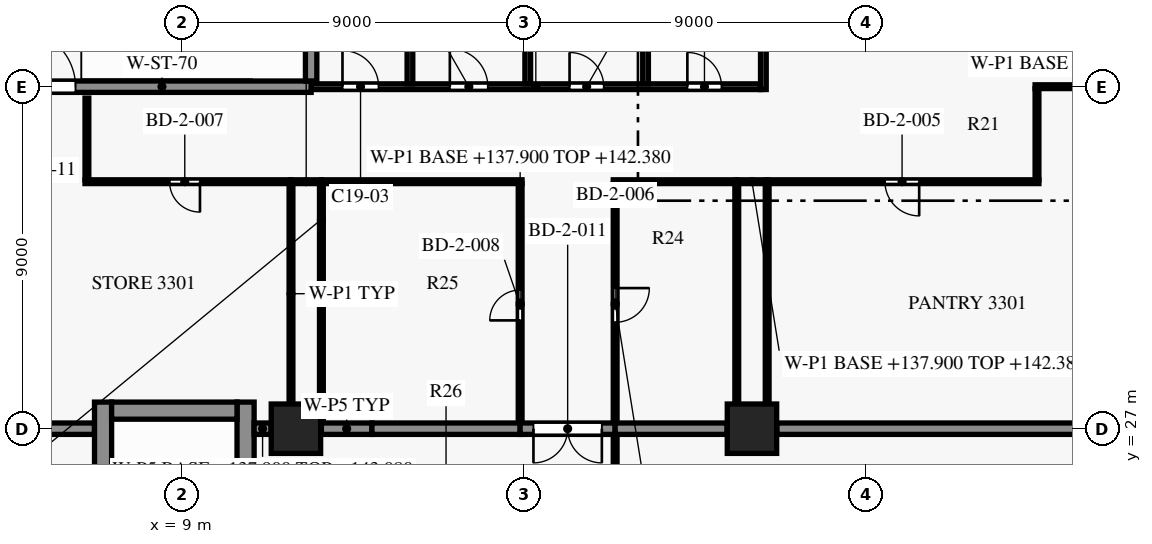
"""IFC4 building model, lengths in metres.
Left out: names, types, materials, properties, quantities, classifications, styles, units other than length and angle.
Written with IfcOpenShell. Run it as: python <this file> out.ifc"""

import sys

from ifc_helpers import new_model, si_unit, direction, frame, frame_2d, origin, origin_2d, place, context, subcontext, project, spatial, rectangle, extrude, element, fill, save


model = new_model("IFC4")
c1 = context("Model", 3, precision=1e-05, world=origin(), true_north=direction((0.0, 1.0)))
c2 = subcontext(c1, "Body", "Model", "MODEL_VIEW")
j1 = project(units=[si_unit("LENGTHUNIT", "METRE"), si_unit("PLANEANGLEUNIT", "RADIAN")], contexts=[c1])
p1 = place(None, origin())
s1 = spatial("IfcSite", under=j1, at=p1, CompositionType="ELEMENT")
p2 = place(p1, origin())
s2 = spatial("IfcBuilding", under=s1, at=p2, CompositionType="ELEMENT")
p3 = place(p2, frame((0.0, 0.0, 137.9)))
s3 = spatial("IfcBuildingStorey", under=s2, at=p3, CompositionType="ELEMENT", Elevation=137.9)
for number, where, z_axis, x_axis in (
    (1, (12.0, 27.0, 0.0), (0.0, 0.0, 1.0), (1.0, 0.0, 0.0)),
    (2, (24.0, 27.0, 0.0), (0.0, 0.0, 1.0), (1.0, 0.0, 0.0)),
):
    element("IfcColumn", number, at=place(p3, frame(where, z_axis=z_axis, x_axis=x_axis)), inside=s3, PredefinedType="COLUMN", context=c2, shape_type="SweptSolid", body=[
        extrude(rectangle(XDim=1.3, YDim=1.3, at=origin_2d()), origin(), (0.0, 0.0, 1.0), 5.5),
    ])
p4 = place(p3, frame((7.15, 27.475, 0.0), z_axis=(0.0, 0.0, 1.0), x_axis=(1.0, 0.0, 0.0)))
e3 = element("IfcWall", 3, at=p4, inside=s3, PredefinedType="SHEAR", context=c2, shape_type="SweptSolid", body=[
    extrude(rectangle(XDim=3.3, YDim=0.45, at=frame_2d((1.65, 0.0))), origin(), (0.0, 0.0, 1.0), 5.2),
])
p5 = place(p3, frame((12.4, 36.0, 0.0), z_axis=(0.0, 0.0, 1.0), x_axis=(1.0, 0.0, 0.0)))
e4 = element("IfcWall", 4, at=p5, inside=s3, PredefinedType="SHEAR", context=c2, shape_type="SweptSolid", body=[
    extrude(rectangle(XDim=11.825, YDim=0.15, at=frame_2d((5.913, 0.0))), origin(), (0.0, 0.0, 1.0), 5.2),
])
p6 = place(p5, frame((0.825, 0.0, 0.0)))
e5 = element("IfcOpeningElement", 5, at=p6, cuts=e4, PredefinedType="OPENING", context=c2, shape_type="SweptSolid", body=[
    extrude(rectangle(XDim=0.95, YDim=2.1, at=frame_2d((0.475, 1.05))), frame((0.0, 0.085, 0.0), z_axis=(0.0, -1.0, 0.0), x_axis=(1.0, 0.0, 0.0)), (0.0, 0.0, 1.0), 0.17),
])
p7 = place(p5, frame((3.65, 0.0, 0.0)))
e6 = element("IfcOpeningElement", 6, at=p7, cuts=e4, PredefinedType="OPENING", context=c2, shape_type="SweptSolid", body=[
    extrude(rectangle(XDim=1.0, YDim=2.1, at=frame_2d((0.5, 1.05))), frame((0.0, 0.085, 0.0), z_axis=(0.0, -1.0, 0.0), x_axis=(1.0, 0.0, 0.0)), (0.0, 0.0, 1.0), 0.17),
])
p8 = place(p5, frame((6.8, 0.0, 0.0)))
e7 = element("IfcOpeningElement", 7, at=p8, cuts=e4, PredefinedType="OPENING", context=c2, shape_type="SweptSolid", body=[
    extrude(rectangle(XDim=0.9, YDim=2.1, at=frame_2d((0.45, 1.05))), frame((0.0, 0.085, 0.0), z_axis=(0.0, -1.0, 0.0), x_axis=(1.0, 0.0, 0.0)), (0.0, 0.0, 1.0), 0.17),
])
p9 = place(p5, frame((9.9, 0.0, 0.0)))
e8 = element("IfcOpeningElement", 8, at=p9, cuts=e4, PredefinedType="OPENING", context=c2, shape_type="SweptSolid", body=[
    extrude(rectangle(XDim=0.9, YDim=2.1, at=frame_2d((0.45, 1.05))), frame((0.0, 0.085, 0.0), z_axis=(0.0, -1.0, 0.0), x_axis=(1.0, 0.0, 0.0)), (0.0, 0.0, 1.0), 0.17),
])
p10 = place(p3, frame((4.55, 36.0, 0.0), z_axis=(0.0, 0.0, 1.0), x_axis=(1.0, 0.0, 0.0)))
e9 = element("IfcWall", 9, at=p10, inside=s3, PredefinedType="SHEAR", context=c2, shape_type="SweptSolid", body=[
    extrude(rectangle(XDim=7.85, YDim=0.3, at=frame_2d((3.925, 0.0))), origin(), (0.0, 0.0, 1.0), 5.2),
])
p11 = place(p10, frame((0.15, 0.0, 0.0)))
e10 = element("IfcOpeningElement", 10, at=p11, cuts=e9, PredefinedType="OPENING", context=c2, shape_type="SweptSolid", body=[
    extrude(rectangle(XDim=1.5, YDim=2.2, at=frame_2d((0.75, 1.1))), frame((0.0, 0.16, 0.0), z_axis=(0.0, -1.0, 0.0), x_axis=(1.0, 0.0, 0.0)), (0.0, 0.0, 1.0), 0.32),
])
p12 = place(p3, frame((6.925, 19.1, 0.0), z_axis=(0.0, 0.0, 1.0), x_axis=(0.0, 1.0, 0.0)))
e11 = element("IfcWall", 11, at=p12, inside=s3, PredefinedType="SHEAR", context=c2, shape_type="SweptSolid", body=[
    extrude(rectangle(XDim=8.6, YDim=0.45, at=frame_2d((4.3, 0.0))), origin(), (0.0, 0.0, 1.0), 5.2),
])
p13 = place(p3, frame((10.675, 19.1, 0.0), z_axis=(0.0, 0.0, 1.0), x_axis=(0.0, 1.0, 0.0)))
e12 = element("IfcWall", 12, at=p13, inside=s3, PredefinedType="SHEAR", context=c2, shape_type="SweptSolid", body=[
    extrude(rectangle(XDim=8.6, YDim=0.45, at=frame_2d((4.3, 0.0))), origin(), (0.0, 0.0, 1.0), 5.2),
])
p14 = place(p13, frame((0.7, 0.0, 0.0)))
e13 = element("IfcOpeningElement", 13, at=p14, cuts=e12, PredefinedType="OPENING", context=c2, shape_type="SweptSolid", body=[
    extrude(rectangle(XDim=1.2, YDim=2.2, at=frame_2d((0.6, 1.1))), frame((0.0, 0.235, 0.0), z_axis=(0.0, -1.0, 0.0), x_axis=(1.0, 0.0, 0.0)), (0.0, 0.0, 1.0), 0.47),
])
p15 = place(p3, frame((12.4, 36.15, 0.0), z_axis=(0.0, 0.0, 1.0), x_axis=(0.0, 1.0, 0.0)))
e14 = element("IfcWall", 14, at=p15, inside=s3, PredefinedType="SHEAR", context=c2, shape_type="SweptSolid", body=[
    extrude(rectangle(XDim=3.725, YDim=0.3, at=frame_2d((1.863, 0.0))), origin(), (0.0, 0.0, 1.0), 5.2),
])
for number, where, z_axis, x_axis in (
    (15, (15.0, 36.075, 0.0), (0.0, 0.0, 1.0), (0.0, 1.0, 0.0)),
    (16, (18.1, 36.075, 0.0), (0.0, 0.0, 1.0), (0.0, 1.0, 0.0)),
    (17, (21.2, 36.075, 0.0), (0.0, 0.0, 1.0), (0.0, 1.0, 0.0)),
):
    element("IfcWall", number, at=place(p3, frame(where, z_axis=z_axis, x_axis=x_axis)), inside=s3, PredefinedType="PARTITIONING", context=c2, shape_type="SweptSolid", body=[
        extrude(rectangle(XDim=3.8, YDim=0.15, at=frame_2d((1.9, 0.0))), origin(), (0.0, 0.0, 1.0), 5.2),
    ])
p16 = place(p3, frame((24.3, 35.925, 0.0), z_axis=(0.0, 0.0, 1.0), x_axis=(0.0, 1.0, 0.0)))
e18 = element("IfcWall", 18, at=p16, inside=s3, PredefinedType="SHEAR", context=c2, shape_type="SweptSolid", body=[
    extrude(rectangle(XDim=4.075, YDim=0.15, at=frame_2d((2.038, 0.0))), origin(), (0.0, 0.0, 1.0), 5.2),
])
p17 = place(p3, frame((20.4, 26.83, 0.0), z_axis=(0.0, 0.0, 1.0), x_axis=(0.0, -1.0, 0.0)))
e19 = element("IfcWall", 19, at=p17, inside=s3, PredefinedType="PARTITIONING", context=c2, shape_type="SweptSolid", body=[
    extrude(rectangle(XDim=20.78, YDim=0.1, at=frame_2d((10.39, 0.0))), origin(), (0.0, 0.0, 1.0), 3.68),
])
p18 = place(p3, frame((6.7, 27.0, 0.0), z_axis=(0.0, 0.0, 1.0), x_axis=(-1.0, 0.0, 0.0)))
e20 = element("IfcWall", 20, at=p18, inside=s3, PredefinedType="PARTITIONING", context=c2, shape_type="SweptSolid", body=[
    extrude(rectangle(XDim=3.75, YDim=0.3, at=frame_2d((1.875, 0.0))), origin(), (0.0, 0.0, 1.0), 4.48),
])
p19 = place(p3, frame((10.9, 27.0, 0.0), z_axis=(0.0, 0.0, 1.0), x_axis=(1.0, 0.0, 0.0)))
e21 = element("IfcWall", 21, at=p19, inside=s3, PredefinedType="PARTITIONING", context=c2, shape_type="SweptSolid", body=[
    extrude(rectangle(XDim=0.445, YDim=0.3, at=frame_2d((0.223, 0.0))), origin(), (0.0, 0.0, 1.0), 5.18),
])
p20 = place(p3, frame((12.67, 27.0, 0.0), z_axis=(0.0, 0.0, 1.0), x_axis=(1.0, 0.0, 0.0)))
e22 = element("IfcWall", 22, at=p20, inside=s3, PredefinedType="PARTITIONING", context=c2, shape_type="SweptSolid", body=[
    extrude(rectangle(XDim=1.33, YDim=0.3, at=frame_2d((0.665, 0.0))), origin(), (0.0, 0.0, 1.0), 4.48),
])
p21 = place(p3, frame((14.0, 27.0, 0.0), z_axis=(0.0, 0.0, 1.0), x_axis=(1.0, 0.0, 0.0)))
e23 = element("IfcWall", 23, at=p21, inside=s3, PredefinedType="PARTITIONING", context=c2, shape_type="SweptSolid", body=[
    extrude(rectangle(XDim=3.9, YDim=0.3, at=frame_2d((1.95, 0.0))), origin(), (0.0, 0.0, 1.0), 4.48),
])
p22 = place(p3, frame((20.4, 27.0, 0.0), z_axis=(0.0, 0.0, 1.0), x_axis=(-1.0, 0.0, 0.0)))
e24 = element("IfcWall", 24, at=p22, inside=s3, PredefinedType="PARTITIONING", context=c2, shape_type="SweptSolid", body=[
    extrude(rectangle(XDim=2.5, YDim=0.3, at=frame_2d((1.25, 0.0))), origin(), (0.0, 0.0, 1.0), 4.48),
])
p23 = place(p22, frame((0.35, 0.0, 0.0)))
e25 = element("IfcOpeningElement", 25, at=p23, cuts=e24, PredefinedType="OPENING", context=c2, shape_type="SweptSolid", body=[
    extrude(rectangle(XDim=1.8, YDim=2.1, at=frame_2d((0.9, 1.05))), frame((0.0, 0.16, 0.0), z_axis=(0.0, -1.0, 0.0), x_axis=(1.0, 0.0, 0.0)), (0.0, 0.0, 1.0), 0.32),
])
p24 = place(p3, frame((23.345, 27.0, 0.0), z_axis=(0.0, 0.0, 1.0), x_axis=(-1.0, 0.0, 0.0)))
e26 = element("IfcWall", 26, at=p24, inside=s3, PredefinedType="PARTITIONING", context=c2, shape_type="SweptSolid", body=[
    extrude(rectangle(XDim=2.945, YDim=0.3, at=frame_2d((1.473, 0.0))), origin(), (0.0, 0.0, 1.0), 4.48),
])
p25 = place(p3, frame((33.05, 27.0, 0.0), z_axis=(0.0, 0.0, 1.0), x_axis=(-1.0, 0.0, 0.0)))
e27 = element("IfcWall", 27, at=p25, inside=s3, PredefinedType="PARTITIONING", context=c2, shape_type="SweptSolid", body=[
    extrude(rectangle(XDim=8.395, YDim=0.3, at=frame_2d((4.198, 0.0))), origin(), (0.0, 0.0, 1.0), 4.48),
])
p26 = place(p3, frame((12.67, 27.17, 0.0), z_axis=(0.0, 0.0, 1.0), x_axis=(0.0, 1.0, 0.0)))
e28 = element("IfcWall", 28, at=p26, inside=s3, PredefinedType="PARTITIONING", context=c2, shape_type="SweptSolid", body=[
    extrude(rectangle(XDim=6.28, YDim=0.1, at=frame_2d((3.14, 0.0))), origin(), (0.0, 0.0, 1.0), 4.48),
])
p27 = place(p3, frame((17.9, 27.17, 0.0), z_axis=(0.0, 0.0, 1.0), x_axis=(0.0, 1.0, 0.0)))
e29 = element("IfcWall", 29, at=p27, inside=s3, PredefinedType="PARTITIONING", context=c2, shape_type="SweptSolid", body=[
    extrude(rectangle(XDim=6.28, YDim=0.1, at=frame_2d((3.14, 0.0))), origin(), (0.0, 0.0, 1.0), 4.48),
])
p28 = place(p27, frame((2.68, 0.0, 0.0)))
e30 = element("IfcOpeningElement", 30, at=p28, cuts=e29, PredefinedType="OPENING", context=c2, shape_type="SweptSolid", body=[
    extrude(rectangle(XDim=0.8, YDim=2.1, at=frame_2d((0.4, 1.05))), frame((0.0, 0.06, 0.0), z_axis=(0.0, -1.0, 0.0), x_axis=(1.0, 0.0, 0.0)), (0.0, 0.0, 1.0), 0.12),
])
for number, where, z_axis, x_axis in (
    (31, (24.4, 27.655, 0.0), (0.0, 0.0, 1.0), (0.0, 1.0, 0.0)),
    (32, (11.87, 33.45, 0.0), (0.0, 0.0, 1.0), (0.0, -1.0, 0.0)),
):
    element("IfcWall", number, at=place(p3, frame(where, z_axis=z_axis, x_axis=x_axis)), inside=s3, PredefinedType="PARTITIONING", context=c2, shape_type="SweptSolid", body=[
        extrude(rectangle(XDim=5.795, YDim=0.1, at=frame_2d((2.897, 0.0))), origin(), (0.0, 0.0, 1.0), 5.18),
    ])
p29 = place(p3, frame((20.4, 33.45, 0.0), z_axis=(0.0, 0.0, 1.0), x_axis=(0.0, -1.0, 0.0)))
e33 = element("IfcWall", 33, at=p29, inside=s3, PredefinedType="PARTITIONING", context=c2, shape_type="SweptSolid", body=[
    extrude(rectangle(XDim=6.28, YDim=0.1, at=frame_2d((3.14, 0.0))), origin(), (0.0, 0.0, 1.0), 4.48),
])
p30 = place(p29, frame((2.75, 0.0, 0.0)))
e34 = element("IfcOpeningElement", 34, at=p30, cuts=e33, PredefinedType="OPENING", context=c2, shape_type="SweptSolid", body=[
    extrude(rectangle(XDim=0.9, YDim=2.1, at=frame_2d((0.45, 1.05))), frame((0.0, 0.06, 0.0), z_axis=(0.0, -1.0, 0.0), x_axis=(1.0, 0.0, 0.0)), (0.0, 0.0, 1.0), 0.12),
])
p31 = place(p3, frame((23.6, 33.45, 0.0), z_axis=(0.0, 0.0, 1.0), x_axis=(0.0, -1.0, 0.0)))
e35 = element("IfcWall", 35, at=p31, inside=s3, PredefinedType="PARTITIONING", context=c2, shape_type="SweptSolid", body=[
    extrude(rectangle(XDim=5.795, YDim=0.1, at=frame_2d((2.897, 0.0))), origin(), (0.0, 0.0, 1.0), 5.18),
])
p32 = place(p3, frame((11.87, 33.5, 0.0), z_axis=(0.0, 0.0, 1.0), x_axis=(-1.0, 0.0, 0.0)))
e36 = element("IfcWall", 36, at=p32, inside=s3, PredefinedType="PARTITIONING", context=c2, shape_type="SweptSolid", body=[
    extrude(rectangle(XDim=5.42, YDim=0.1, at=frame_2d((2.71, 0.0))), origin(), (0.0, 0.0, 1.0), 5.18),
])
p33 = place(p32, frame((2.395, 0.0, 0.0)))
e37 = element("IfcOpeningElement", 37, at=p33, cuts=e36, PredefinedType="OPENING", context=c2, shape_type="SweptSolid", body=[
    extrude(rectangle(XDim=0.8, YDim=2.1, at=frame_2d((0.4, 1.05))), frame((0.0, 0.06, 0.0), z_axis=(0.0, -1.0, 0.0), x_axis=(1.0, 0.0, 0.0)), (0.0, 0.0, 1.0), 0.12),
])
p34 = place(p3, frame((12.67, 33.5, 0.0), z_axis=(0.0, 0.0, 1.0), x_axis=(-1.0, 0.0, 0.0)))
e38 = element("IfcWall", 38, at=p34, inside=s3, PredefinedType="PARTITIONING", context=c2, shape_type="SweptSolid", body=[
    extrude(rectangle(XDim=0.8, YDim=0.1, at=frame_2d((0.4, 0.0))), origin(), (0.0, 0.0, 1.0), 4.48),
])
p35 = place(p3, frame((17.95, 33.5, 0.0), z_axis=(0.0, 0.0, 1.0), x_axis=(-1.0, 0.0, 0.0)))
e39 = element("IfcWall", 39, at=p35, inside=s3, PredefinedType="PARTITIONING", context=c2, shape_type="SweptSolid", body=[
    extrude(rectangle(XDim=5.28, YDim=0.1, at=frame_2d((2.64, 0.0))), origin(), (0.0, 0.0, 1.0), 5.18),
])
p36 = place(p3, frame((23.6, 33.5, 0.0), z_axis=(0.0, 0.0, 1.0), x_axis=(-1.0, 0.0, 0.0)))
e40 = element("IfcWall", 40, at=p36, inside=s3, PredefinedType="PARTITIONING", context=c2, shape_type="SweptSolid", body=[
    extrude(rectangle(XDim=3.25, YDim=0.1, at=frame_2d((1.625, 0.0))), origin(), (0.0, 0.0, 1.0), 5.18),
])
p37 = place(p3, frame((24.4, 33.5, 0.0), z_axis=(0.0, 0.0, 1.0), x_axis=(-1.0, 0.0, 0.0)))
e41 = element("IfcWall", 41, at=p37, inside=s3, PredefinedType="PARTITIONING", context=c2, shape_type="SweptSolid", body=[
    extrude(rectangle(XDim=0.8, YDim=0.1, at=frame_2d((0.4, 0.0))), origin(), (0.0, 0.0, 1.0), 4.48),
])
p38 = place(p3, frame((31.55, 33.5, 0.0), z_axis=(0.0, 0.0, 1.0), x_axis=(-1.0, 0.0, 0.0)))
e42 = element("IfcWall", 42, at=p38, inside=s3, PredefinedType="PARTITIONING", context=c2, shape_type="SweptSolid", body=[
    extrude(rectangle(XDim=7.15, YDim=0.1, at=frame_2d((3.575, 0.0))), origin(), (0.0, 0.0, 1.0), 5.18),
])
p39 = place(p38, frame((3.15, 0.0, 0.0)))
e43 = element("IfcOpeningElement", 43, at=p39, cuts=e42, PredefinedType="OPENING", context=c2, shape_type="SweptSolid", body=[
    extrude(rectangle(XDim=0.9, YDim=2.1, at=frame_2d((0.45, 1.05))), frame((0.0, 0.06, 0.0), z_axis=(0.0, -1.0, 0.0), x_axis=(1.0, 0.0, 0.0)), (0.0, 0.0, 1.0), 0.12),
])
p40 = place(p3, frame((6.5, 33.55, 0.0), z_axis=(0.0, 0.0, 1.0), x_axis=(0.0, 1.0, 0.0)))
e44 = element("IfcWall", 44, at=p40, inside=s3, PredefinedType="PARTITIONING", context=c2, shape_type="SweptSolid", body=[
    extrude(rectangle(XDim=2.15, YDim=0.1, at=frame_2d((1.075, 0.0))), origin(), (0.0, 0.0, 1.0), 5.18),
])
p41 = place(p3, frame((31.5, 35.95, 0.0), z_axis=(0.0, 0.0, 1.0), x_axis=(0.0, -1.0, 0.0)))
e45 = element("IfcWall", 45, at=p41, inside=s3, PredefinedType="PARTITIONING", context=c2, shape_type="SweptSolid", body=[
    extrude(rectangle(XDim=2.4, YDim=0.1, at=frame_2d((1.2, 0.0))), origin(), (0.0, 0.0, 1.0), 5.18),
])
p42 = place(p3, frame((35.95, 36.0, 0.0), z_axis=(0.0, 0.0, 1.0), x_axis=(-1.0, 0.0, 0.0)))
e46 = element("IfcWall", 46, at=p42, inside=s3, PredefinedType="PARTITIONING", context=c2, shape_type="SweptSolid", body=[
    extrude(rectangle(XDim=4.5, YDim=0.1, at=frame_2d((2.25, 0.0))), origin(), (0.0, 0.0, 1.0), 4.48),
])
p43 = place(p6, origin())
e47 = element("IfcDoor", 47, at=p43, inside=s3, OperationType="SINGLE_SWING_RIGHT", PredefinedType="DOOR", context=c2, shape_type="SweptSolid", body=[
    extrude(rectangle(XDim=0.95, YDim=2.1, at=frame_2d((0.475, 1.05))), frame((0.0, 0.025, 0.0), z_axis=(0.0, -1.0, 0.0), x_axis=(1.0, 0.0, 0.0)), (0.0, 0.0, 1.0), 0.05),
])
fill(e5, e47)
p44 = place(p7, origin())
e48 = element("IfcDoor", 48, at=p44, inside=s3, OperationType="SINGLE_SWING_LEFT", PredefinedType="DOOR", context=c2, shape_type="SweptSolid", body=[
    extrude(rectangle(XDim=1.0, YDim=2.1, at=frame_2d((0.5, 1.05))), frame((0.0, 0.025, 0.0), z_axis=(0.0, -1.0, 0.0), x_axis=(1.0, 0.0, 0.0)), (0.0, 0.0, 1.0), 0.05),
])
fill(e6, e48)
p45 = place(p8, origin())
e49 = element("IfcDoor", 49, at=p45, inside=s3, OperationType="SINGLE_SWING_RIGHT", PredefinedType="DOOR", context=c2, shape_type="SweptSolid", body=[
    extrude(rectangle(XDim=0.9, YDim=2.1, at=frame_2d((0.45, 1.05))), frame((0.0, 0.025, 0.0), z_axis=(0.0, -1.0, 0.0), x_axis=(1.0, 0.0, 0.0)), (0.0, 0.0, 1.0), 0.05),
])
fill(e7, e49)
p46 = place(p9, origin())
e50 = element("IfcDoor", 50, at=p46, inside=s3, OperationType="SINGLE_SWING_LEFT", PredefinedType="DOOR", context=c2, shape_type="SweptSolid", body=[
    extrude(rectangle(XDim=0.9, YDim=2.1, at=frame_2d((0.45, 1.05))), frame((0.0, 0.025, 0.0), z_axis=(0.0, -1.0, 0.0), x_axis=(1.0, 0.0, 0.0)), (0.0, 0.0, 1.0), 0.05),
])
fill(e8, e50)
p47 = place(p11, origin())
e51 = element("IfcDoor", 51, at=p47, inside=s3, OperationType="SINGLE_SWING_RIGHT", PredefinedType="DOOR", context=c2, shape_type="SweptSolid", body=[
    extrude(rectangle(XDim=1.5, YDim=2.2, at=frame_2d((0.75, 1.1))), frame((0.0, 0.025, 0.0), z_axis=(0.0, -1.0, 0.0), x_axis=(1.0, 0.0, 0.0)), (0.0, 0.0, 1.0), 0.05),
])
fill(e10, e51)
p48 = place(p39, origin())
e52 = element("IfcDoor", 52, at=p48, inside=s3, OperationType="SINGLE_SWING_RIGHT", PredefinedType="DOOR", context=c2, shape_type="SweptSolid", body=[
    extrude(rectangle(XDim=0.9, YDim=2.1, at=frame_2d((0.45, 1.05))), frame((0.0, 0.025, 0.0), z_axis=(0.0, -1.0, 0.0), x_axis=(1.0, 0.0, 0.0)), (0.0, 0.0, 1.0), 0.05),
])
fill(e43, e52)
p49 = place(p30, origin())
e53 = element("IfcDoor", 53, at=p49, inside=s3, OperationType="SINGLE_SWING_LEFT", PredefinedType="DOOR", context=c2, shape_type="SweptSolid", body=[
    extrude(rectangle(XDim=0.9, YDim=2.1, at=frame_2d((0.45, 1.05))), frame((0.0, 0.025, 0.0), z_axis=(0.0, -1.0, 0.0), x_axis=(1.0, 0.0, 0.0)), (0.0, 0.0, 1.0), 0.05),
])
fill(e34, e53)
p50 = place(p33, origin())
e54 = element("IfcDoor", 54, at=p50, inside=s3, OperationType="SINGLE_SWING_LEFT", PredefinedType="DOOR", context=c2, shape_type="SweptSolid", body=[
    extrude(rectangle(XDim=0.8, YDim=2.1, at=frame_2d((0.4, 1.05))), frame((0.0, 0.025, 0.0), z_axis=(0.0, -1.0, 0.0), x_axis=(1.0, 0.0, 0.0)), (0.0, 0.0, 1.0), 0.05),
])
fill(e37, e54)
p51 = place(p28, origin())
e55 = element("IfcDoor", 55, at=p51, inside=s3, OperationType="SINGLE_SWING_RIGHT", PredefinedType="DOOR", context=c2, shape_type="SweptSolid", body=[
    extrude(rectangle(XDim=0.8, YDim=2.1, at=frame_2d((0.4, 1.05))), frame((0.0, 0.025, 0.0), z_axis=(0.0, -1.0, 0.0), x_axis=(1.0, 0.0, 0.0)), (0.0, 0.0, 1.0), 0.05),
])
fill(e30, e55)
p52 = place(p23, origin())
e56 = element("IfcDoor", 56, at=p52, inside=s3, OperationType="DOUBLE_DOOR_SINGLE_SWING", PredefinedType="DOOR", context=c2, shape_type="SweptSolid", body=[
    extrude(rectangle(XDim=1.8, YDim=2.1, at=frame_2d((0.9, 1.05))), frame((0.0, 0.025, 0.0), z_axis=(0.0, -1.0, 0.0), x_axis=(1.0, 0.0, 0.0)), (0.0, 0.0, 1.0), 0.05),
])
fill(e25, e56)
save(model, sys.argv[1])
